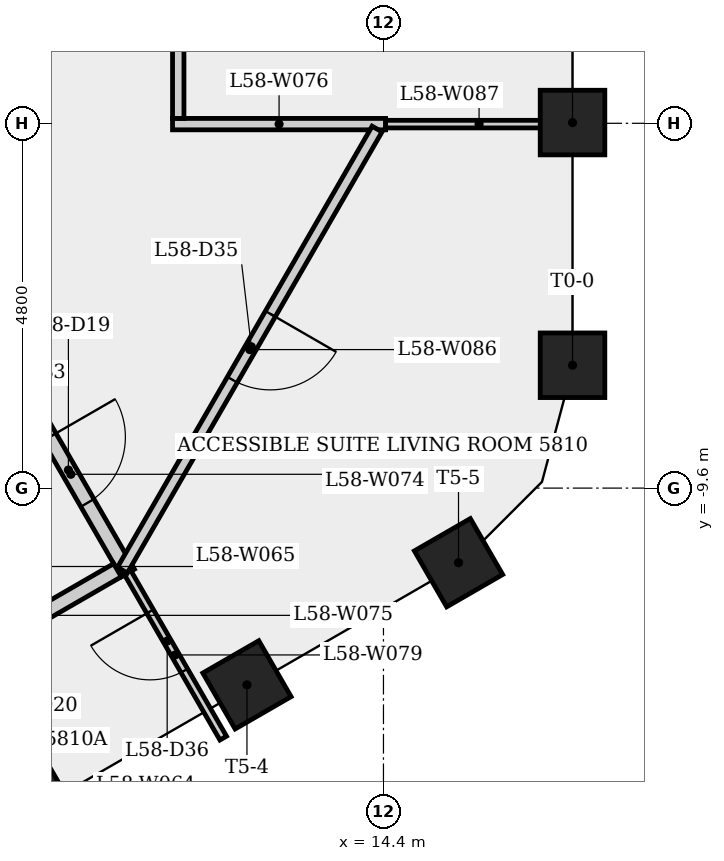
"""IFC4 building model, lengths in metres.
Left out: names, types, materials, properties, quantities, classifications, styles, units other than length and angle.
Written with IfcOpenShell. Run it as: python <this file> out.ifc"""

import sys

from ifc_helpers import new_model, si_unit, direction, frame, frame_2d, origin, origin_2d, place, context, subcontext, project, spatial, rectangle, extrude, element, fill, save


model = new_model("IFC4")
c1 = context("Model", 3, precision=1e-05, world=origin(), true_north=direction((0.0, 1.0)))
c2 = subcontext(c1, "Body", "Model", "MODEL_VIEW")
j1 = project(units=[si_unit("LENGTHUNIT", "METRE"), si_unit("PLANEANGLEUNIT", "RADIAN")], contexts=[c1])
p1 = place(None, origin())
s1 = spatial("IfcSite", under=j1, at=p1, CompositionType="ELEMENT")
p2 = place(p1, origin())
s2 = spatial("IfcBuilding", under=s1, at=p2, CompositionType="ELEMENT")
p3 = place(p2, frame((0.0, 0.0, 218.9)))
s3 = spatial("IfcBuildingStorey", under=s2, at=p3, CompositionType="ELEMENT", Elevation=218.9)
for number, where, z_axis, x_axis in (
    (1, (16.887, -7.984, 0.0), (0.0, 0.0, 1.0), (1.0, 0.0, 0.0)),
    (2, (16.887, -4.79, 0.0), (0.0, 0.0, 1.0), (1.0, 0.0, 0.0)),
    (3, (9.821, -13.796, 0.0), (0.0, 0.0, 1.0), (0.5, -0.866, 0.0)),
    (4, (12.604, -12.189, 0.0), (0.0, 0.0, 1.0), (0.5, -0.866, 0.0)),
    (5, (15.387, -10.582, 0.0), (0.0, 0.0, 1.0), (0.5, -0.866, 0.0)),
):
    element("IfcColumn", number, at=place(p3, frame(where, z_axis=z_axis, x_axis=x_axis)), inside=s3, PredefinedType="COLUMN", context=c2, shape_type="SweptSolid", body=[
        extrude(rectangle(XDim=0.85, YDim=0.85, at=origin_2d()), origin(), (0.0, 0.0, 1.0), 3.4),
    ])
p4 = place(p3, frame((9.537, -8.119, 0.0), z_axis=(0.0, 0.0, 1.0), x_axis=(0.499990139034, -0.866031096941, 0.0)))
e6 = element("IfcWall", 6, at=p4, inside=s3, PredefinedType="PARTITIONING", context=c2, shape_type="SweptSolid", body=[
    extrude(rectangle(XDim=3.0, YDim=0.2, at=frame_2d((1.5, 0.0))), origin(), (0.0, 0.0, 1.0), 3.05),
])
p5 = place(p4, frame((0.935, 0.0, 0.0)))
e7 = element("IfcOpeningElement", 7, at=p5, cuts=e6, PredefinedType="OPENING", context=c2, shape_type="SweptSolid", body=[
    extrude(rectangle(XDim=1.0, YDim=2.1, at=frame_2d((0.5, 1.05))), frame((0.0, 0.11, 0.0), z_axis=(0.0, -1.0, 0.0), x_axis=(1.0, 0.0, 0.0)), (0.0, 0.0, 1.0), 0.22),
])
p6 = place(p3, frame((10.901, -10.681, 0.0), z_axis=(0.0, 0.0, 1.0), x_axis=(-0.866007538022, -0.500030943131, 0.0)))
e8 = element("IfcWall", 8, at=p6, inside=s3, PredefinedType="PARTITIONING", context=c2, shape_type="SweptSolid", body=[
    extrude(rectangle(XDim=2.375, YDim=0.2, at=frame_2d((1.188, 0.0))), origin(), (0.0, 0.0, 1.0), 3.05),
])
p7 = place(p3, frame((11.625, -4.811, 0.0), z_axis=(0.0, 0.0, 1.0), x_axis=(1.0, 0.0, 0.0)))
e9 = element("IfcWall", 9, at=p7, inside=s3, PredefinedType="PARTITIONING", context=c2, shape_type="SweptSolid", body=[
    extrude(rectangle(XDim=2.803, YDim=0.15, at=frame_2d((1.402, 0.0))), origin(), (0.0, 0.0, 1.0), 3.05),
])
p8 = place(p3, frame((11.7, -4.736, 0.0), z_axis=(0.0, 0.0, 1.0), x_axis=(0.0, 1.0, 0.0)))
e10 = element("IfcWall", 10, at=p8, inside=s3, PredefinedType="PARTITIONING", context=c2, shape_type="SweptSolid", body=[
    extrude(rectangle(XDim=9.622, YDim=0.15, at=frame_2d((4.811, 0.0))), origin(), (0.0, 0.0, 1.0), 3.05),
])
p9 = place(p8, frame((2.655, 0.0, 0.0)))
e11 = element("IfcOpeningElement", 11, at=p9, cuts=e10, PredefinedType="OPENING", context=c2, shape_type="SweptSolid", body=[
    extrude(rectangle(XDim=1.0, YDim=2.1, at=frame_2d((0.5, 1.05))), frame((0.0, 0.085, 0.0), z_axis=(0.0, -1.0, 0.0), x_axis=(1.0, 0.0, 0.0)), (0.0, 0.0, 1.0), 0.17),
])
p10 = place(p8, frame((7.443, 0.0, 0.0)))
e12 = element("IfcOpeningElement", 12, at=p10, cuts=e10, PredefinedType="OPENING", context=c2, shape_type="SweptSolid", body=[
    extrude(rectangle(XDim=1.0, YDim=2.1, at=frame_2d((0.5, 1.05))), frame((0.0, 0.085, 0.0), z_axis=(0.0, -1.0, 0.0), x_axis=(1.0, 0.0, 0.0)), (0.0, 0.0, 1.0), 0.17),
])
p11 = place(p3, frame((12.292, -12.89, 0.0), z_axis=(0.0, 0.0, 1.0), x_axis=(-0.500003972934, 0.866023109998, 0.0)))
e13 = element("IfcWall", 13, at=p11, inside=s3, PredefinedType="PARTITIONING", context=c2, shape_type="SweptSolid", body=[
    extrude(rectangle(XDim=2.527, YDim=0.1, at=frame_2d((1.264, 0.0))), origin(), (0.0, 0.0, 1.0), 3.05),
])
p12 = place(p11, frame((1.024, 0.0, 0.0)))
e14 = element("IfcOpeningElement", 14, at=p12, cuts=e13, PredefinedType="OPENING", context=c2, shape_type="SweptSolid", body=[
    extrude(rectangle(XDim=0.9, YDim=2.1, at=frame_2d((0.45, 1.05))), frame((0.0, 0.06, 0.0), z_axis=(0.0, -1.0, 0.0), x_axis=(1.0, 0.0, 0.0)), (0.0, 0.0, 1.0), 0.12),
])
p13 = place(p3, frame((14.316, -4.876, 0.0), z_axis=(0.0, 0.0, 1.0), x_axis=(-0.499994719637, -0.866028452382, 0.0)))
e15 = element("IfcWall", 15, at=p13, inside=s3, PredefinedType="PARTITIONING", context=c2, shape_type="SweptSolid", body=[
    extrude(rectangle(XDim=6.701, YDim=0.15, at=frame_2d((3.351, 0.0))), origin(), (0.0, 0.0, 1.0), 3.05),
])
p14 = place(p13, frame((2.808, 0.0, 0.0)))
e16 = element("IfcOpeningElement", 16, at=p14, cuts=e15, PredefinedType="OPENING", context=c2, shape_type="SweptSolid", body=[
    extrude(rectangle(XDim=1.0, YDim=2.1, at=frame_2d((0.5, 1.05))), frame((0.0, 0.085, 0.0), z_axis=(0.0, -1.0, 0.0), x_axis=(1.0, 0.0, 0.0)), (0.0, 0.0, 1.0), 0.17),
])
p15 = place(p3, frame((16.887, -4.811, 0.0), z_axis=(0.0, 0.0, 1.0), x_axis=(-1.0, 0.0, 0.0)))
e17 = element("IfcWall", 17, at=p15, inside=s3, PredefinedType="PARTITIONING", context=c2, shape_type="SweptSolid", body=[
    extrude(rectangle(XDim=2.459, YDim=0.1, at=frame_2d((1.229, 0.0))), origin(), (0.0, 0.0, 1.0), 3.05),
])
p16 = place(p5, origin())
e18 = element("IfcDoor", 18, at=p16, inside=s3, OperationType="SINGLE_SWING_LEFT", PredefinedType="DOOR", context=c2, shape_type="SweptSolid", body=[
    extrude(rectangle(XDim=1.0, YDim=2.1, at=frame_2d((0.5, 1.05))), frame((0.0, 0.025, 0.0), z_axis=(0.0, -1.0, 0.0), x_axis=(1.0, 0.0, 0.0)), (0.0, 0.0, 1.0), 0.05),
])
fill(e7, e18)
p17 = place(p14, origin())
e19 = element("IfcDoor", 19, at=p17, inside=s3, OperationType="SINGLE_SWING_LEFT", PredefinedType="DOOR", context=c2, shape_type="SweptSolid", body=[
    extrude(rectangle(XDim=1.0, YDim=2.1, at=frame_2d((0.5, 1.05))), frame((0.0, 0.025, 0.0), z_axis=(0.0, -1.0, 0.0), x_axis=(1.0, 0.0, 0.0)), (0.0, 0.0, 1.0), 0.05),
])
fill(e16, e19)
p18 = place(p12, origin())
e20 = element("IfcDoor", 20, at=p18, inside=s3, OperationType="SINGLE_SWING_RIGHT", PredefinedType="DOOR", context=c2, shape_type="SweptSolid", body=[
    extrude(rectangle(XDim=0.9, YDim=2.1, at=frame_2d((0.45, 1.05))), frame((0.0, 0.025, 0.0), z_axis=(0.0, -1.0, 0.0), x_axis=(1.0, 0.0, 0.0)), (0.0, 0.0, 1.0), 0.05),
])
fill(e14, e20)
save(model, sys.argv[1])
